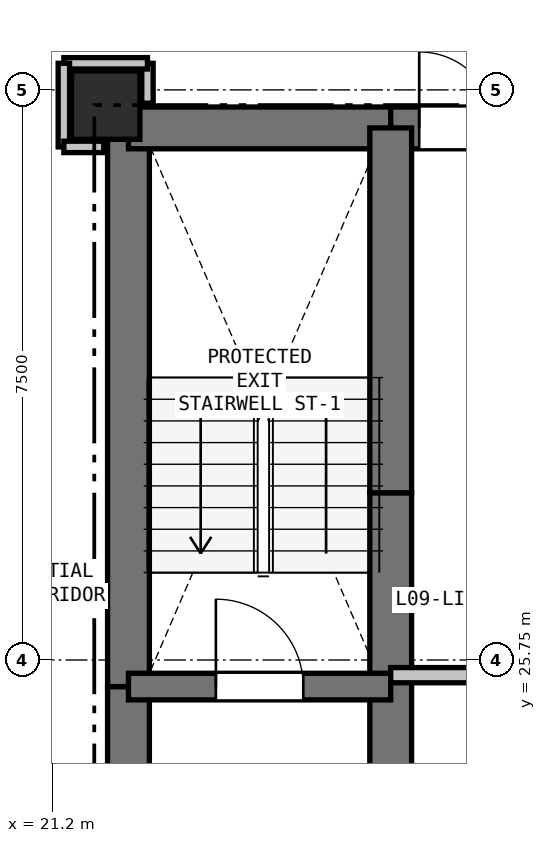
"""IFC4 building model, lengths in metres.
Left out: names, types, materials, properties, quantities, classifications, styles, units other than length and angle.
Written with IfcOpenShell. Run it as: python <this file> out.ifc"""

import sys

from ifc_helpers import new_model, si_unit, direction, frame, frame_2d, origin, origin_2d, place, context, subcontext, project, spatial, rectangle, extrude, element, fill, save


model = new_model("IFC4")
c1 = context("Model", 3, precision=1e-05, world=origin(), true_north=direction((0.0, 1.0)))
c2 = subcontext(c1, "Body", "Model", "MODEL_VIEW")
j1 = project(units=[si_unit("LENGTHUNIT", "METRE"), si_unit("PLANEANGLEUNIT", "RADIAN")], contexts=[c1])
p1 = place(None, origin())
s1 = spatial("IfcSite", under=j1, at=p1, CompositionType="ELEMENT")
p2 = place(p1, origin())
s2 = spatial("IfcBuilding", under=s1, at=p2, CompositionType="ELEMENT")
p3 = place(p2, frame((0.0, 0.0, 35.7)))
s3 = spatial("IfcBuildingStorey", under=s2, at=p3, CompositionType="ELEMENT", Elevation=35.7)
p4 = place(p3, frame((21.9, 33.05, 0.0), z_axis=(0.0, 0.0, 1.0), x_axis=(1.0, 0.0, 0.0)))
e1 = element("IfcColumn", 1, at=p4, inside=s3, PredefinedType="COLUMN", context=c2, shape_type="SweptSolid", body=[
    extrude(rectangle(XDim=0.9, YDim=0.9, at=origin_2d()), origin(), (0.0, 0.0, 1.0), 3.3),
])
p5 = place(p3, frame((22.2, 20.75, 0.0), z_axis=(0.0, 0.0, 1.0), x_axis=(0.0, 1.0, 0.0)))
e2 = element("IfcWall", 2, at=p5, inside=s3, PredefinedType="SHEAR", context=c2, shape_type="SweptSolid", body=[
    extrude(rectangle(XDim=4.65, YDim=0.55, at=frame_2d((2.325, 0.0))), origin(), (0.0, 0.0, 1.0), 3.04),
])
p6 = place(p3, frame((22.2, 25.4, 0.0), z_axis=(0.0, 0.0, 1.0), x_axis=(0.0, 1.0, 0.0)))
e3 = element("IfcWall", 3, at=p6, inside=s3, PredefinedType="SHEAR", context=c2, shape_type="SweptSolid", body=[
    extrude(rectangle(XDim=7.35, YDim=0.55, at=frame_2d((3.675, 0.0))), origin(), (0.0, 0.0, 1.0), 3.04),
])
p7 = place(p3, frame((22.2, 32.75, 0.0), z_axis=(0.0, 0.0, 1.0), x_axis=(1.0, 0.0, 0.0)))
e4 = element("IfcWall", 4, at=p7, inside=s3, PredefinedType="SHEAR", context=c2, shape_type="SweptSolid", body=[
    extrude(rectangle(XDim=3.45, YDim=0.55, at=frame_2d((1.725, 0.0))), origin(), (0.0, 0.0, 1.0), 3.04),
])
p8 = place(p3, frame((25.65, 32.75, 0.0), z_axis=(0.0, 0.0, 1.0), x_axis=(1.0, 0.0, 0.0)))
e5 = element("IfcWall", 5, at=p8, inside=s3, PredefinedType="SHEAR", context=c2, shape_type="SweptSolid", body=[
    extrude(rectangle(XDim=1.75, YDim=0.55, at=frame_2d((0.875, 0.0))), origin(), (0.0, 0.0, 1.0), 3.04),
])
p9 = place(p8, frame((0.375, 0.0, 0.0)))
e6 = element("IfcOpeningElement", 6, at=p9, cuts=e5, PredefinedType="OPENING", context=c2, shape_type="SweptSolid", body=[
    extrude(rectangle(XDim=1.0, YDim=2.15, at=frame_2d((0.5, 1.075))), frame((0.0, 0.285, 0.0), z_axis=(0.0, -1.0, 0.0), x_axis=(1.0, 0.0, 0.0)), (0.0, 0.0, 1.0), 0.57),
])
p10 = place(p3, frame((25.65, 22.75, 0.0), z_axis=(0.0, 0.0, 1.0), x_axis=(0.0, 1.0, 0.0)))
e7 = element("IfcWall", 7, at=p10, inside=s3, PredefinedType="SHEAR", context=c2, shape_type="SweptSolid", body=[
    extrude(rectangle(XDim=2.8, YDim=0.55, at=frame_2d((1.4, 0.0))), origin(), (0.0, 0.0, 1.0), 3.04),
])
p11 = place(p3, frame((25.65, 25.55, 0.0), z_axis=(0.0, 0.0, 1.0), x_axis=(0.0, 1.0, 0.0)))
e8 = element("IfcWall", 8, at=p11, inside=s3, PredefinedType="SHEAR", context=c2, shape_type="SweptSolid", body=[
    extrude(rectangle(XDim=2.4, YDim=0.55, at=frame_2d((1.2, 0.0))), origin(), (0.0, 0.0, 1.0), 3.04),
])
p12 = place(p3, frame((25.65, 27.95, 0.0), z_axis=(0.0, 0.0, 1.0), x_axis=(0.0, 1.0, 0.0)))
e9 = element("IfcWall", 9, at=p12, inside=s3, PredefinedType="SHEAR", context=c2, shape_type="SweptSolid", body=[
    extrude(rectangle(XDim=4.8, YDim=0.55, at=frame_2d((2.4, 0.0))), origin(), (0.0, 0.0, 1.0), 3.04),
])
p13 = place(p3, frame((22.2, 25.4, 0.0), z_axis=(0.0, 0.0, 1.0), x_axis=(1.0, 0.0, 0.0)))
e10 = element("IfcWall", 10, at=p13, inside=s3, PredefinedType="SHEAR", context=c2, shape_type="SweptSolid", body=[
    extrude(rectangle(XDim=3.45, YDim=0.35, at=frame_2d((1.725, 0.0))), origin(), (0.0, 0.0, 1.0), 3.04),
])
p14 = place(p13, frame((1.15, 0.0, 0.0)))
e11 = element("IfcOpeningElement", 11, at=p14, cuts=e10, PredefinedType="OPENING", context=c2, shape_type="SweptSolid", body=[
    extrude(rectangle(XDim=1.15, YDim=2.15, at=frame_2d((0.575, 1.075))), frame((0.0, 0.185, 0.0), z_axis=(0.0, -1.0, 0.0), x_axis=(1.0, 0.0, 0.0)), (0.0, 0.0, 1.0), 0.37),
])
p15 = place(p3, frame((25.65, 25.55, 0.0), z_axis=(0.0, 0.0, 1.0), x_axis=(1.0, 0.0, 0.0)))
e12 = element("IfcWall", 12, at=p15, inside=s3, PredefinedType="PARTITIONING", context=c2, shape_type="SweptSolid", body=[
    extrude(rectangle(XDim=4.95, YDim=0.2, at=frame_2d((2.475, 0.0))), origin(), (0.0, 0.0, 1.0), 3.04),
])
p16 = place(p3, frame((22.45, 33.075, 0.0), z_axis=(0.0, 0.0, 1.0), x_axis=(0.0, 1.0, 0.0)))
e13 = element("IfcWall", 13, at=p16, inside=s3, PredefinedType="PARTITIONING", context=c2, shape_type="SweptSolid", body=[
    extrude(rectangle(XDim=0.525, YDim=0.15, at=frame_2d((0.263, 0.0))), origin(), (0.0, 0.0, 1.0), 2.488),
])
p17 = place(p3, frame((22.45, 33.6, 0.0), z_axis=(0.0, 0.0, 1.0), x_axis=(-1.0, 0.0, 0.0)))
e14 = element("IfcWall", 14, at=p17, inside=s3, PredefinedType="PARTITIONING", context=c2, shape_type="SweptSolid", body=[
    extrude(rectangle(XDim=1.1, YDim=0.15, at=frame_2d((0.55, 0.0))), origin(), (0.0, 0.0, 1.0), 3.04),
])
p18 = place(p3, frame((21.35, 33.6, 0.0), z_axis=(0.0, 0.0, 1.0), x_axis=(0.0, -1.0, 0.0)))
e15 = element("IfcWall", 15, at=p18, inside=s3, PredefinedType="PARTITIONING", context=c2, shape_type="SweptSolid", body=[
    extrude(rectangle(XDim=1.1, YDim=0.15, at=frame_2d((0.55, 0.0))), origin(), (0.0, 0.0, 1.0), 2.338),
])
p19 = place(p3, frame((21.35, 32.5, 0.0), z_axis=(0.0, 0.0, 1.0), x_axis=(1.0, 0.0, 0.0)))
e16 = element("IfcWall", 16, at=p19, inside=s3, PredefinedType="PARTITIONING", context=c2, shape_type="SweptSolid", body=[
    extrude(rectangle(XDim=0.525, YDim=0.15, at=frame_2d((0.262, 0.0))), origin(), (0.0, 0.0, 1.0), 2.488),
])
p20 = place(p9, origin())
e17 = element("IfcDoor", 17, at=p20, inside=s3, OperationType="SINGLE_SWING_LEFT", PredefinedType="DOOR", context=c2, shape_type="SweptSolid", body=[
    extrude(rectangle(XDim=1.0, YDim=2.15, at=frame_2d((0.5, 1.075))), frame((0.0, 0.025, 0.0), z_axis=(0.0, -1.0, 0.0), x_axis=(1.0, 0.0, 0.0)), (0.0, 0.0, 1.0), 0.05),
])
fill(e6, e17)
p21 = place(p14, origin())
e18 = element("IfcDoor", 18, at=p21, inside=s3, OperationType="SINGLE_SWING_LEFT", PredefinedType="DOOR", context=c2, shape_type="SweptSolid", body=[
    extrude(rectangle(XDim=1.15, YDim=2.15, at=frame_2d((0.575, 1.075))), frame((0.0, 0.025, 0.0), z_axis=(0.0, -1.0, 0.0), x_axis=(1.0, 0.0, 0.0)), (0.0, 0.0, 1.0), 0.05),
])
fill(e11, e18)
save(model, sys.argv[1])
